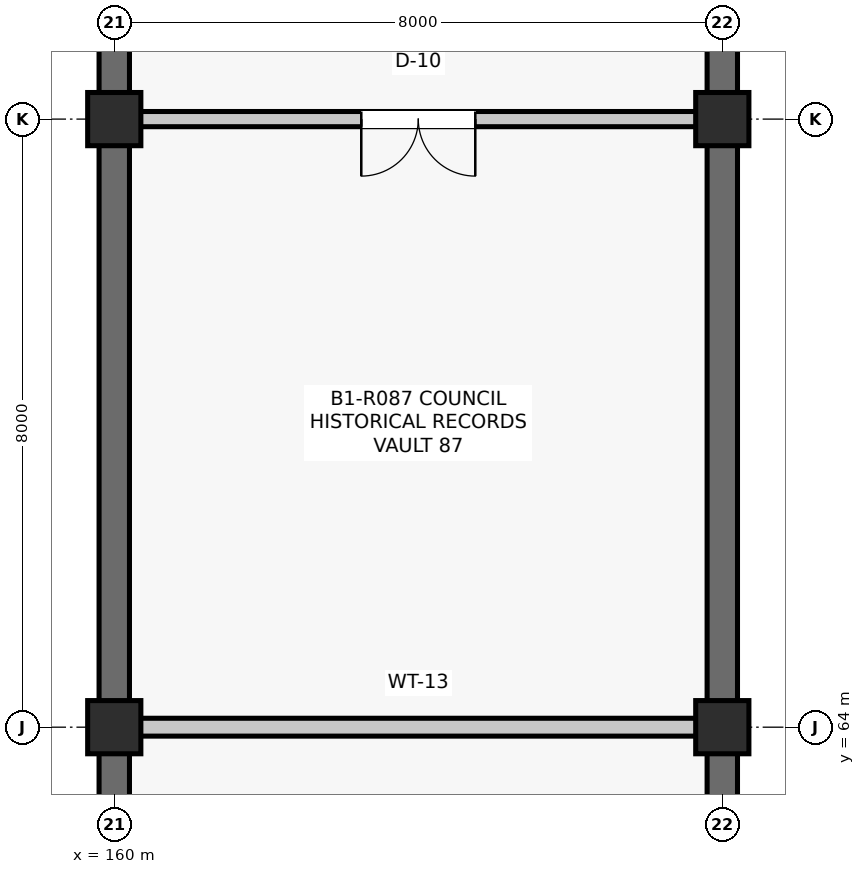
"""IFC4 building model, lengths in metres.
Left out: names, types, materials, properties, quantities, classifications, styles, units other than length and angle.
Written with IfcOpenShell. Run it as: python <this file> out.ifc"""

import sys

from ifc_helpers import new_model, si_unit, direction, frame, frame_2d, origin, origin_2d, place, context, subcontext, project, spatial, rectangle, extrude, element, fill, save


model = new_model("IFC4")
c1 = context("Model", 3, precision=1e-05, world=origin(), true_north=direction((0.0, 1.0)))
c2 = subcontext(c1, "Body", "Model", "MODEL_VIEW")
j1 = project(units=[si_unit("LENGTHUNIT", "METRE"), si_unit("PLANEANGLEUNIT", "RADIAN")], contexts=[c1])
p1 = place(None, origin())
s1 = spatial("IfcSite", under=j1, at=p1, CompositionType="ELEMENT")
p2 = place(p1, origin())
s2 = spatial("IfcBuilding", under=s1, at=p2, CompositionType="ELEMENT")
p3 = place(p2, frame((0.0, 0.0, -4.29)))
s3 = spatial("IfcBuildingStorey", under=s2, at=p3, CompositionType="ELEMENT", Elevation=-4.29)
for number, where, z_axis, x_axis in (
    (1, (160.0, 64.0, 0.0), (0.0, 0.0, 1.0), (1.0, 0.0, 0.0)),
    (2, (160.0, 72.0, 0.0), (0.0, 0.0, 1.0), (1.0, 0.0, 0.0)),
    (3, (168.0, 64.0, 0.0), (0.0, 0.0, 1.0), (1.0, 0.0, 0.0)),
    (4, (168.0, 72.0, 0.0), (0.0, 0.0, 1.0), (1.0, 0.0, 0.0)),
):
    element("IfcColumn", number, at=place(p3, frame(where, z_axis=z_axis, x_axis=x_axis)), inside=s3, PredefinedType="COLUMN", context=c2, shape_type="SweptSolid", body=[
        extrude(rectangle(XDim=0.7, YDim=0.7, at=origin_2d()), origin(), (0.0, 0.0, 1.0), 4.29),
    ])
p4 = place(p3, frame((160.0, 56.335, 0.0), z_axis=(0.0, 0.0, 1.0), x_axis=(0.0, 1.0, 0.0)))
e5 = element("IfcWall", 5, at=p4, inside=s3, PredefinedType="SHEAR", context=c2, shape_type="SweptSolid", body=[
    extrude(rectangle(XDim=7.33, YDim=0.4, at=frame_2d((3.665, 0.0))), origin(), (0.0, 0.0, 1.0), 3.604),
])
p5 = place(p3, frame((168.0, 56.335, 0.0), z_axis=(0.0, 0.0, 1.0), x_axis=(0.0, 1.0, 0.0)))
e6 = element("IfcWall", 6, at=p5, inside=s3, PredefinedType="SHEAR", context=c2, shape_type="SweptSolid", body=[
    extrude(rectangle(XDim=7.33, YDim=0.4, at=frame_2d((3.665, 0.0))), origin(), (0.0, 0.0, 1.0), 3.4),
])
p6 = place(p3, frame((160.0, 64.335, 0.0), z_axis=(0.0, 0.0, 1.0), x_axis=(0.0, 1.0, 0.0)))
e7 = element("IfcWall", 7, at=p6, inside=s3, PredefinedType="SHEAR", context=c2, shape_type="SweptSolid", body=[
    extrude(rectangle(XDim=7.33, YDim=0.4, at=frame_2d((3.665, 0.0))), origin(), (0.0, 0.0, 1.0), 3.667),
])
p7 = place(p3, frame((168.0, 64.335, 0.0), z_axis=(0.0, 0.0, 1.0), x_axis=(0.0, 1.0, 0.0)))
e8 = element("IfcWall", 8, at=p7, inside=s3, PredefinedType="SHEAR", context=c2, shape_type="SweptSolid", body=[
    extrude(rectangle(XDim=7.33, YDim=0.4, at=frame_2d((3.665, 0.0))), origin(), (0.0, 0.0, 1.0), 3.409),
])
p8 = place(p3, frame((160.0, 72.335, 0.0), z_axis=(0.0, 0.0, 1.0), x_axis=(0.0, 1.0, 0.0)))
e9 = element("IfcWall", 9, at=p8, inside=s3, PredefinedType="SHEAR", context=c2, shape_type="SweptSolid", body=[
    extrude(rectangle(XDim=7.33, YDim=0.4, at=frame_2d((3.665, 0.0))), origin(), (0.0, 0.0, 1.0), 3.6),
])
p9 = place(p3, frame((168.0, 72.335, 0.0), z_axis=(0.0, 0.0, 1.0), x_axis=(0.0, 1.0, 0.0)))
e10 = element("IfcWall", 10, at=p9, inside=s3, PredefinedType="SHEAR", context=c2, shape_type="SweptSolid", body=[
    extrude(rectangle(XDim=7.305, YDim=0.4, at=frame_2d((3.652, 0.0))), origin(), (0.0, 0.0, 1.0), 3.401),
])
p10 = place(p3, frame((160.34, 64.0, 0.0), z_axis=(0.0, 0.0, 1.0), x_axis=(1.0, 0.0, 0.0)))
e11 = element("IfcWall", 11, at=p10, inside=s3, PredefinedType="PARTITIONING", context=c2, shape_type="SweptSolid", body=[
    extrude(rectangle(XDim=7.32, YDim=0.235, at=frame_2d((3.66, 0.0))), origin(), (0.0, 0.0, 1.0), 3.317),
])
p11 = place(p3, frame((160.34, 72.0, 0.0), z_axis=(0.0, 0.0, 1.0), x_axis=(1.0, 0.0, 0.0)))
e12 = element("IfcWall", 12, at=p11, inside=s3, PredefinedType="PARTITIONING", context=c2, shape_type="SweptSolid", body=[
    extrude(rectangle(XDim=7.32, YDim=0.2, at=frame_2d((3.66, 0.0))), origin(), (0.0, 0.0, 1.0), 3.393),
])
p12 = place(p11, frame((2.91, 0.0, 0.0)))
e13 = element("IfcOpeningElement", 13, at=p12, cuts=e12, PredefinedType="OPENING", context=c2, shape_type="SweptSolid", body=[
    extrude(rectangle(XDim=1.5, YDim=2.25, at=frame_2d((0.75, 1.125))), frame((0.0, 0.11, 0.0), z_axis=(0.0, -1.0, 0.0), x_axis=(1.0, 0.0, 0.0)), (0.0, 0.0, 1.0), 0.22),
])
p13 = place(p12, frame((1.5, 0.0, 0.0), z_axis=(0.0, 0.0, 1.0), x_axis=(-1.0, 0.0, 0.0)))
e14 = element("IfcDoor", 14, at=p13, inside=s3, OperationType="DOUBLE_DOOR_SINGLE_SWING", PredefinedType="DOOR", context=c2, shape_type="SweptSolid", body=[
    extrude(rectangle(XDim=1.5, YDim=2.25, at=frame_2d((0.75, 1.125))), frame((0.0, 0.025, 0.0), z_axis=(0.0, -1.0, 0.0), x_axis=(1.0, 0.0, 0.0)), (0.0, 0.0, 1.0), 0.05),
])
fill(e13, e14)
save(model, sys.argv[1])
